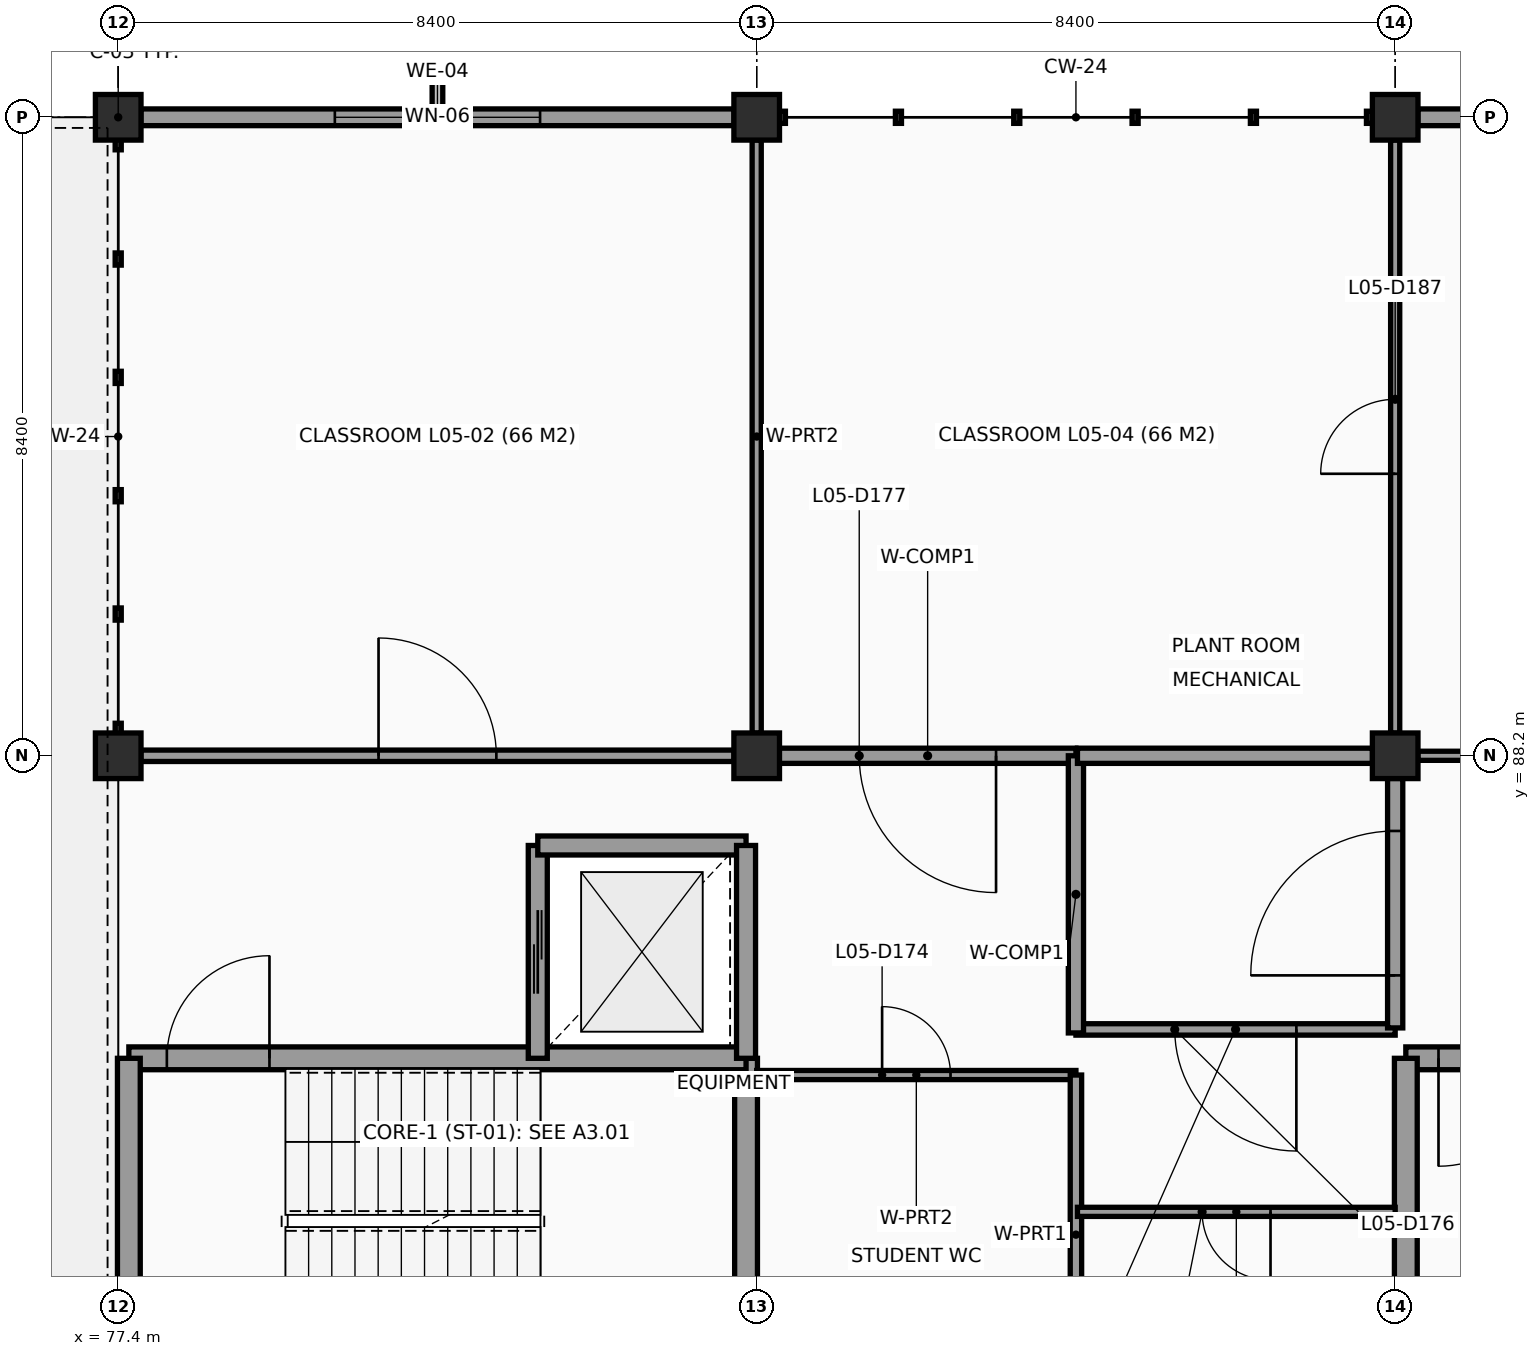
"""IFC4 building model, lengths in metres.
Left out: names, types, materials, properties, quantities, classifications, styles, units other than length and angle.
Written with IfcOpenShell. Run it as: python <this file> out.ifc"""

import sys

from ifc_helpers import new_model, si_unit, direction, frame, frame_2d, origin, origin_2d, place, context, subcontext, project, spatial, rectangle, extrude, element, fill, save


model = new_model("IFC4")
c1 = context("Model", 3, precision=1e-05, world=origin(), true_north=direction((0.0, 1.0)))
c2 = subcontext(c1, "Body", "Model", "MODEL_VIEW")
j1 = project(units=[si_unit("LENGTHUNIT", "METRE"), si_unit("PLANEANGLEUNIT", "RADIAN")], contexts=[c1])
p1 = place(None, origin())
s1 = spatial("IfcSite", under=j1, at=p1, CompositionType="ELEMENT")
p2 = place(p1, origin())
s2 = spatial("IfcBuilding", under=s1, at=p2, CompositionType="ELEMENT")
p3 = place(p2, frame((0.0, 0.0, 18.6)))
s3 = spatial("IfcBuildingStorey", under=s2, at=p3, CompositionType="ELEMENT", Elevation=18.6)
for number, where, z_axis, x_axis in (
    (1, (77.4, 88.2, 0.0), (0.0, 0.0, 1.0), (1.0, 0.0, 0.0)),
    (2, (77.4, 96.6, 0.0), (0.0, 0.0, 1.0), (1.0, 0.0, 0.0)),
    (3, (85.8, 88.2, 0.0), (0.0, 0.0, 1.0), (1.0, 0.0, 0.0)),
    (4, (85.8, 96.6, 0.0), (0.0, 0.0, 1.0), (1.0, 0.0, 0.0)),
    (5, (94.2, 88.2, 0.0), (0.0, 0.0, 1.0), (1.0, 0.0, 0.0)),
    (6, (94.2, 96.6, 0.0), (0.0, 0.0, 1.0), (1.0, 0.0, 0.0)),
):
    element("IfcColumn", number, at=place(p3, frame(where, z_axis=z_axis, x_axis=x_axis)), inside=s3, PredefinedType="COLUMN", context=c2, shape_type="SweptSolid", body=[
        extrude(rectangle(XDim=0.6, YDim=0.6, at=origin_2d()), origin(), (0.0, 0.0, 1.0), 3.6),
    ])
p4 = place(p3, frame((77.698, 96.6, 0.0), z_axis=(0.0, 0.0, 1.0), x_axis=(1.0, 0.0, 0.0)))
e7 = element("IfcWall", 7, at=p4, inside=s3, PredefinedType="SOLIDWALL", context=c2, shape_type="SweptSolid", body=[
    extrude(rectangle(XDim=7.804, YDim=0.22, at=frame_2d((3.902, 0.0))), origin(), (0.0, 0.0, 1.0), 2.65),
])
p5 = place(p4, frame((2.552, 0.0, 0.95)))
e8 = element("IfcOpeningElement", 8, at=p5, cuts=e7, PredefinedType="OPENING", context=c2, shape_type="SweptSolid", body=[
    extrude(rectangle(XDim=2.7, YDim=1.2, at=frame_2d((1.35, 0.6))), frame((0.0, 0.12, 0.0), z_axis=(0.0, -1.0, 0.0), x_axis=(1.0, 0.0, 0.0)), (0.0, 0.0, 1.0), 0.24),
])
p6 = place(p3, frame((94.498, 96.6, 0.0), z_axis=(0.0, 0.0, 1.0), x_axis=(1.0, 0.0, 0.0)))
e9 = element("IfcWall", 9, at=p6, inside=s3, PredefinedType="SOLIDWALL", context=c2, shape_type="SweptSolid", body=[
    extrude(rectangle(XDim=7.804, YDim=0.22, at=frame_2d((3.902, 0.0))), origin(), (0.0, 0.0, 1.0), 2.65),
])
p7 = place(p6, frame((2.402, 0.0, 0.95)))
e10 = element("IfcOpeningElement", 10, at=p7, cuts=e9, PredefinedType="OPENING", context=c2, shape_type="SweptSolid", body=[
    extrude(rectangle(XDim=3.0, YDim=1.2, at=frame_2d((1.5, 0.6))), frame((0.0, 0.12, 0.0), z_axis=(0.0, -1.0, 0.0), x_axis=(1.0, 0.0, 0.0)), (0.0, 0.0, 1.0), 0.24),
])
p8 = place(p3, frame((85.66, 79.94, 0.0), z_axis=(0.0, 0.0, 1.0), x_axis=(0.0, 1.0, 0.0)))
e11 = element("IfcWall", 11, at=p8, inside=s3, PredefinedType="SHEAR", context=c2, shape_type="SweptSolid", body=[
    extrude(rectangle(XDim=4.28, YDim=0.3, at=frame_2d((2.14, 0.0))), origin(), (0.0, 0.0, 1.0), 3.6),
])
p9 = place(p3, frame((85.66, 84.22, 0.0), z_axis=(0.0, 0.0, 1.0), x_axis=(-1.0, 0.0, 0.0)))
e12 = element("IfcWall", 12, at=p9, inside=s3, PredefinedType="SHEAR", context=c2, shape_type="SweptSolid", body=[
    extrude(rectangle(XDim=8.12, YDim=0.3, at=frame_2d((4.06, 0.0))), origin(), (0.0, 0.0, 1.0), 3.6),
])
p10 = place(p9, frame((6.27, 0.0, 0.0)))
e13 = element("IfcOpeningElement", 13, at=p10, cuts=e12, PredefinedType="OPENING", context=c2, shape_type="SweptSolid", body=[
    extrude(rectangle(XDim=1.35, YDim=2.15, at=frame_2d((0.675, 1.075))), frame((0.0, 0.16, 0.0), z_axis=(0.0, -1.0, 0.0), x_axis=(1.0, 0.0, 0.0)), (0.0, 0.0, 1.0), 0.32),
])
p11 = place(p3, frame((77.54, 84.22, 0.0), z_axis=(0.0, 0.0, 1.0), x_axis=(0.0, -1.0, 0.0)))
e14 = element("IfcWall", 14, at=p11, inside=s3, PredefinedType="SHEAR", context=c2, shape_type="SweptSolid", body=[
    extrude(rectangle(XDim=4.28, YDim=0.3, at=frame_2d((2.14, 0.0))), origin(), (0.0, 0.0, 1.0), 3.6),
])
p12 = place(p3, frame((82.92, 87.02, 0.0), z_axis=(0.0, 0.0, 1.0), x_axis=(0.0, -1.0, 0.0)))
e15 = element("IfcWall", 15, at=p12, inside=s3, PredefinedType="SHEAR", context=c2, shape_type="SweptSolid", body=[
    extrude(rectangle(XDim=2.8, YDim=0.25, at=frame_2d((1.4, 0.0))), origin(), (0.0, 0.0, 1.0), 3.6),
])
p13 = place(p12, frame((0.85, 0.0, 0.0)))
e16 = element("IfcOpeningElement", 16, at=p13, cuts=e15, PredefinedType="OPENING", context=c2, shape_type="SweptSolid", body=[
    extrude(rectangle(XDim=1.1, YDim=2.15, at=frame_2d((0.55, 1.075))), frame((0.0, 0.135, 0.0), z_axis=(0.0, -1.0, 0.0), x_axis=(1.0, 0.0, 0.0)), (0.0, 0.0, 1.0), 0.27),
])
p14 = place(p3, frame((85.66, 87.02, 0.0), z_axis=(0.0, 0.0, 1.0), x_axis=(-1.0, 0.0, 0.0)))
e17 = element("IfcWall", 17, at=p14, inside=s3, PredefinedType="SHEAR", context=c2, shape_type="SweptSolid", body=[
    extrude(rectangle(XDim=2.74, YDim=0.25, at=frame_2d((1.37, 0.0))), origin(), (0.0, 0.0, 1.0), 3.6),
])
p15 = place(p3, frame((85.66, 84.22, 0.0), z_axis=(0.0, 0.0, 1.0), x_axis=(0.0, 1.0, 0.0)))
e18 = element("IfcWall", 18, at=p15, inside=s3, PredefinedType="SHEAR", context=c2, shape_type="SweptSolid", body=[
    extrude(rectangle(XDim=2.8, YDim=0.25, at=frame_2d((1.4, 0.0))), origin(), (0.0, 0.0, 1.0), 3.6),
])
p16 = place(p3, frame((102.46, 84.22, 0.0), z_axis=(0.0, 0.0, 1.0), x_axis=(-1.0, 0.0, 0.0)))
e19 = element("IfcWall", 19, at=p16, inside=s3, PredefinedType="SHEAR", context=c2, shape_type="SweptSolid", body=[
    extrude(rectangle(XDim=8.12, YDim=0.3, at=frame_2d((4.06, 0.0))), origin(), (0.0, 0.0, 1.0), 3.6),
])
p17 = place(p16, frame((6.27, 0.0, 0.0)))
e20 = element("IfcOpeningElement", 20, at=p17, cuts=e19, PredefinedType="OPENING", context=c2, shape_type="SweptSolid", body=[
    extrude(rectangle(XDim=1.42, YDim=2.15, at=frame_2d((0.71, 1.075))), frame((0.0, 0.16, 0.0), z_axis=(0.0, -1.0, 0.0), x_axis=(1.0, 0.0, 0.0)), (0.0, 0.0, 1.0), 0.32),
])
p18 = place(p3, frame((94.34, 84.22, 0.0), z_axis=(0.0, 0.0, 1.0), x_axis=(0.0, -1.0, 0.0)))
e21 = element("IfcWall", 21, at=p18, inside=s3, PredefinedType="SHEAR", context=c2, shape_type="SweptSolid", body=[
    extrude(rectangle(XDim=4.28, YDim=0.3, at=frame_2d((2.14, 0.0))), origin(), (0.0, 0.0, 1.0), 3.6),
])
p19 = place(p3, frame((85.8, 84.0, 0.0), z_axis=(0.0, 0.0, 1.0), x_axis=(1.0, 0.0, 0.0)))
e22 = element("IfcWall", 22, at=p19, inside=s3, PredefinedType="PARTITIONING", context=c2, shape_type="SweptSolid", body=[
    extrude(rectangle(XDim=4.2, YDim=0.12, at=frame_2d((2.1, 0.0))), origin(), (0.0, 0.0, 1.0), 2.95),
])
p20 = place(p19, frame((1.65, 0.0, 0.0)))
e23 = element("IfcOpeningElement", 23, at=p20, cuts=e22, PredefinedType="OPENING", context=c2, shape_type="SweptSolid", body=[
    extrude(rectangle(XDim=0.9, YDim=2.1, at=frame_2d((0.45, 1.05))), frame((0.0, 0.07, 0.0), z_axis=(0.0, -1.0, 0.0), x_axis=(1.0, 0.0, 0.0)), (0.0, 0.0, 1.0), 0.14),
])
p21 = place(p3, frame((90.0, 84.0, 0.0), z_axis=(0.0, 0.0, 1.0), x_axis=(0.0, -1.0, 0.0)))
e24 = element("IfcWall", 24, at=p21, inside=s3, PredefinedType="PARTITIONING", context=c2, shape_type="SweptSolid", body=[
    extrude(rectangle(XDim=4.2, YDim=0.15, at=frame_2d((2.1, 0.0))), origin(), (0.0, 0.0, 1.0), 2.55),
])
p22 = place(p3, frame((90.02, 82.2, 0.0), z_axis=(0.0, 0.0, 1.0), x_axis=(1.0, 0.0, 0.0)))
e25 = element("IfcWall", 25, at=p22, inside=s3, PredefinedType="PARTITIONING", context=c2, shape_type="SweptSolid", body=[
    extrude(rectangle(XDim=4.18, YDim=0.12, at=frame_2d((2.09, 0.0))), origin(), (0.0, 0.0, 1.0), 2.99),
])
p23 = place(p22, frame((1.64, 0.0, 0.0)))
e26 = element("IfcOpeningElement", 26, at=p23, cuts=e25, PredefinedType="OPENING", context=c2, shape_type="SweptSolid", body=[
    extrude(rectangle(XDim=0.9, YDim=2.1, at=frame_2d((0.45, 1.05))), frame((0.0, 0.07, 0.0), z_axis=(0.0, -1.0, 0.0), x_axis=(1.0, 0.0, 0.0)), (0.0, 0.0, 1.0), 0.14),
])
p24 = place(p3, frame((90.0, 84.6, 0.0), z_axis=(0.0, 0.0, 1.0), x_axis=(1.0, 0.0, 0.0)))
e27 = element("IfcWall", 27, at=p24, inside=s3, PredefinedType="PARTITIONING", context=c2, shape_type="SweptSolid", body=[
    extrude(rectangle(XDim=4.2, YDim=0.15, at=frame_2d((2.1, 0.0))), origin(), (0.0, 0.0, 1.0), 2.99),
])
p25 = place(p24, frame((1.3, 0.0, 0.0)))
e28 = element("IfcOpeningElement", 28, at=p25, cuts=e27, PredefinedType="OPENING", context=c2, shape_type="SweptSolid", body=[
    extrude(rectangle(XDim=1.6, YDim=2.2, at=frame_2d((0.8, 1.1))), frame((0.0, 0.085, 0.0), z_axis=(0.0, -1.0, 0.0), x_axis=(1.0, 0.0, 0.0)), (0.0, 0.0, 1.0), 0.17),
])
p26 = place(p3, frame((86.098, 88.2, 0.0), z_axis=(0.0, 0.0, 1.0), x_axis=(1.0, 0.0, 0.0)))
e29 = element("IfcWall", 29, at=p26, inside=s3, PredefinedType="PARTITIONING", context=c2, shape_type="SweptSolid", body=[
    extrude(rectangle(XDim=3.902, YDim=0.2, at=frame_2d((1.951, 0.0))), origin(), (0.0, 0.0, 1.0), 2.9),
])
p27 = place(p26, frame((1.051, 0.0, 0.0)))
e30 = element("IfcOpeningElement", 30, at=p27, cuts=e29, PredefinedType="OPENING", context=c2, shape_type="SweptSolid", body=[
    extrude(rectangle(XDim=1.8, YDim=2.25, at=frame_2d((0.9, 1.125))), frame((0.0, 0.11, 0.0), z_axis=(0.0, -1.0, 0.0), x_axis=(1.0, 0.0, 0.0)), (0.0, 0.0, 1.0), 0.22),
])
p28 = place(p3, frame((90.0, 88.2, 0.0), z_axis=(0.0, 0.0, 1.0), x_axis=(0.0, -1.0, 0.0)))
e31 = element("IfcWall", 31, at=p28, inside=s3, PredefinedType="PARTITIONING", context=c2, shape_type="SweptSolid", body=[
    extrude(rectangle(XDim=3.646, YDim=0.2, at=frame_2d((1.823, 0.0))), origin(), (0.0, 0.0, 1.0), 2.9),
])
p29 = place(p3, frame((90.02, 88.2, 0.0), z_axis=(0.0, 0.0, 1.0), x_axis=(1.0, 0.0, 0.0)))
e32 = element("IfcWall", 32, at=p29, inside=s3, PredefinedType="PARTITIONING", context=c2, shape_type="SweptSolid", body=[
    extrude(rectangle(XDim=3.882, YDim=0.2, at=frame_2d((1.941, 0.0))), origin(), (0.0, 0.0, 1.0), 2.9),
])
p30 = place(p3, frame((94.2, 87.902, 0.0), z_axis=(0.0, 0.0, 1.0), x_axis=(0.0, -1.0, 0.0)))
e33 = element("IfcWall", 33, at=p30, inside=s3, PredefinedType="PARTITIONING", context=c2, shape_type="SweptSolid", body=[
    extrude(rectangle(XDim=3.282, YDim=0.2, at=frame_2d((1.641, 0.0))), origin(), (0.0, 0.0, 1.0), 2.99),
])
p31 = place(p30, frame((0.691, 0.0, 0.0)))
e34 = element("IfcOpeningElement", 34, at=p31, cuts=e33, PredefinedType="OPENING", context=c2, shape_type="SweptSolid", body=[
    extrude(rectangle(XDim=1.9, YDim=2.3, at=frame_2d((0.95, 1.15))), frame((0.0, 0.11, 0.0), z_axis=(0.0, -1.0, 0.0), x_axis=(1.0, 0.0, 0.0)), (0.0, 0.0, 1.0), 0.22),
])
p32 = place(p3, frame((85.8, 96.302, 0.0), z_axis=(0.0, 0.0, 1.0), x_axis=(0.0, -1.0, 0.0)))
e35 = element("IfcWall", 35, at=p32, inside=s3, PredefinedType="PARTITIONING", context=c2, shape_type="SweptSolid", body=[
    extrude(rectangle(XDim=7.804, YDim=0.12, at=frame_2d((3.902, 0.0))), origin(), (0.0, 0.0, 1.0), 2.95),
])
p33 = place(p3, frame((85.502, 88.2, 0.0), z_axis=(0.0, 0.0, 1.0), x_axis=(-1.0, 0.0, 0.0)))
e36 = element("IfcWall", 36, at=p33, inside=s3, PredefinedType="PARTITIONING", context=c2, shape_type="SweptSolid", body=[
    extrude(rectangle(XDim=7.804, YDim=0.15, at=frame_2d((3.902, 0.0))), origin(), (0.0, 0.0, 1.0), 2.9),
])
p34 = place(p33, frame((3.127, 0.0, 0.0)))
e37 = element("IfcOpeningElement", 37, at=p34, cuts=e36, PredefinedType="OPENING", context=c2, shape_type="SweptSolid", body=[
    extrude(rectangle(XDim=1.55, YDim=2.2, at=frame_2d((0.775, 1.1))), frame((0.0, 0.085, 0.0), z_axis=(0.0, -1.0, 0.0), x_axis=(1.0, 0.0, 0.0)), (0.0, 0.0, 1.0), 0.17),
])
p35 = place(p3, frame((94.2, 96.302, 0.0), z_axis=(0.0, 0.0, 1.0), x_axis=(0.0, -1.0, 0.0)))
e38 = element("IfcWall", 38, at=p35, inside=s3, PredefinedType="PARTITIONING", context=c2, shape_type="SweptSolid", body=[
    extrude(rectangle(XDim=7.804, YDim=0.12, at=frame_2d((3.902, 0.0))), origin(), (0.0, 0.0, 1.0), 2.99),
])
p36 = place(p35, frame((3.412, 0.0, 0.0)))
e39 = element("IfcOpeningElement", 39, at=p36, cuts=e38, PredefinedType="OPENING", context=c2, shape_type="SweptSolid", body=[
    extrude(rectangle(XDim=0.98, YDim=2.12, at=frame_2d((0.49, 1.06))), frame((0.0, 0.07, 0.0), z_axis=(0.0, -1.0, 0.0), x_axis=(1.0, 0.0, 0.0)), (0.0, 0.0, 1.0), 0.14),
])
p37 = place(p3, frame((102.302, 88.2, 0.0), z_axis=(0.0, 0.0, 1.0), x_axis=(-1.0, 0.0, 0.0)))
e40 = element("IfcWall", 40, at=p37, inside=s3, PredefinedType="PARTITIONING", context=c2, shape_type="SweptSolid", body=[
    extrude(rectangle(XDim=7.804, YDim=0.12, at=frame_2d((3.902, 0.0))), origin(), (0.0, 0.0, 1.0), 2.9),
])
p38 = place(p37, frame((3.442, 0.0, 0.0)))
e41 = element("IfcOpeningElement", 41, at=p38, cuts=e40, PredefinedType="OPENING", context=c2, shape_type="SweptSolid", body=[
    extrude(rectangle(XDim=0.92, YDim=2.1, at=frame_2d((0.46, 1.05))), frame((0.0, 0.07, 0.0), z_axis=(0.0, -1.0, 0.0), x_axis=(1.0, 0.0, 0.0)), (0.0, 0.0, 1.0), 0.14),
])
p39 = place(p5, origin())
e42 = element("IfcWindow", 42, at=p39, inside=s3, PartitioningType="SINGLE_PANEL", PredefinedType="WINDOW", context=c2, shape_type="SweptSolid", body=[
    extrude(rectangle(XDim=2.7, YDim=1.2, at=frame_2d((1.35, 0.6))), frame((0.0, 0.03, 0.0), z_axis=(0.0, -1.0, 0.0), x_axis=(1.0, 0.0, 0.0)), (0.0, 0.0, 1.0), 0.06),
])
fill(e8, e42)
p40 = place(p10, frame((1.35, 0.0, 0.0), z_axis=(0.0, 0.0, 1.0), x_axis=(-1.0, 0.0, 0.0)))
e43 = element("IfcDoor", 43, at=p40, inside=s3, OperationType="SINGLE_SWING_LEFT", PredefinedType="DOOR", context=c2, shape_type="SweptSolid", body=[
    extrude(rectangle(XDim=1.35, YDim=2.15, at=frame_2d((0.675, 1.075))), frame((0.0, 0.025, 0.0), z_axis=(0.0, -1.0, 0.0), x_axis=(1.0, 0.0, 0.0)), (0.0, 0.0, 1.0), 0.05),
])
fill(e13, e43)
p41 = place(p13, origin())
e44 = element("IfcDoor", 44, at=p41, inside=s3, OperationType="DOUBLE_DOOR_SLIDING", PredefinedType="DOOR", context=c2, shape_type="SweptSolid", body=[
    extrude(rectangle(XDim=1.1, YDim=2.15, at=frame_2d((0.55, 1.075))), frame((0.0, 0.025, 0.0), z_axis=(0.0, -1.0, 0.0), x_axis=(1.0, 0.0, 0.0)), (0.0, 0.0, 1.0), 0.05),
])
fill(e16, e44)
p42 = place(p17, frame((1.42, 0.0, 0.0), z_axis=(0.0, 0.0, 1.0), x_axis=(-1.0, 0.0, 0.0)))
e45 = element("IfcDoor", 45, at=p42, inside=s3, OperationType="SINGLE_SWING_RIGHT", PredefinedType="DOOR", context=c2, shape_type="SweptSolid", body=[
    extrude(rectangle(XDim=1.42, YDim=2.15, at=frame_2d((0.71, 1.075))), frame((0.0, 0.025, 0.0), z_axis=(0.0, -1.0, 0.0), x_axis=(1.0, 0.0, 0.0)), (0.0, 0.0, 1.0), 0.05),
])
fill(e20, e45)
p43 = place(p20, origin())
e46 = element("IfcDoor", 46, at=p43, inside=s3, OperationType="SINGLE_SWING_LEFT", PredefinedType="DOOR", context=c2, shape_type="SweptSolid", body=[
    extrude(rectangle(XDim=0.9, YDim=2.1, at=frame_2d((0.45, 1.05))), frame((0.0, 0.025, 0.0), z_axis=(0.0, -1.0, 0.0), x_axis=(1.0, 0.0, 0.0)), (0.0, 0.0, 1.0), 0.05),
])
fill(e23, e46)
p44 = place(p23, origin())
e47 = element("IfcDoor", 47, at=p44, inside=s3, OperationType="SINGLE_SWING_RIGHT", PredefinedType="DOOR", context=c2, shape_type="SweptSolid", body=[
    extrude(rectangle(XDim=0.9, YDim=2.1, at=frame_2d((0.45, 1.05))), frame((0.0, 0.025, 0.0), z_axis=(0.0, -1.0, 0.0), x_axis=(1.0, 0.0, 0.0)), (0.0, 0.0, 1.0), 0.05),
])
fill(e26, e47)
p45 = place(p25, origin())
e48 = element("IfcDoor", 48, at=p45, inside=s3, OperationType="DOUBLE_DOOR_SINGLE_SWING", PredefinedType="DOOR", context=c2, shape_type="SweptSolid", body=[
    extrude(rectangle(XDim=1.6, YDim=2.2, at=frame_2d((0.8, 1.1))), frame((0.0, 0.025, 0.0), z_axis=(0.0, -1.0, 0.0), x_axis=(1.0, 0.0, 0.0)), (0.0, 0.0, 1.0), 0.05),
])
fill(e28, e48)
p46 = place(p27, origin())
e49 = element("IfcDoor", 49, at=p46, inside=s3, OperationType="DOUBLE_DOOR_SINGLE_SWING", PredefinedType="DOOR", context=c2, shape_type="SweptSolid", body=[
    extrude(rectangle(XDim=1.8, YDim=2.25, at=frame_2d((0.9, 1.125))), frame((0.0, 0.025, 0.0), z_axis=(0.0, -1.0, 0.0), x_axis=(1.0, 0.0, 0.0)), (0.0, 0.0, 1.0), 0.05),
])
fill(e30, e49)
p47 = place(p31, origin())
e50 = element("IfcDoor", 50, at=p47, inside=s3, OperationType="DOUBLE_DOOR_SINGLE_SWING", PredefinedType="DOOR", context=c2, shape_type="SweptSolid", body=[
    extrude(rectangle(XDim=1.9, YDim=2.3, at=frame_2d((0.95, 1.15))), frame((0.0, 0.025, 0.0), z_axis=(0.0, -1.0, 0.0), x_axis=(1.0, 0.0, 0.0)), (0.0, 0.0, 1.0), 0.05),
])
fill(e34, e50)
p48 = place(p34, origin())
e51 = element("IfcDoor", 51, at=p48, inside=s3, OperationType="DOUBLE_DOOR_SINGLE_SWING", PredefinedType="DOOR", context=c2, shape_type="SweptSolid", body=[
    extrude(rectangle(XDim=1.55, YDim=2.2, at=frame_2d((0.775, 1.1))), frame((0.0, 0.025, 0.0), z_axis=(0.0, -1.0, 0.0), x_axis=(1.0, 0.0, 0.0)), (0.0, 0.0, 1.0), 0.05),
])
fill(e37, e51)
p49 = place(p36, origin())
e52 = element("IfcDoor", 52, at=p49, inside=s3, OperationType="SINGLE_SWING_RIGHT", PredefinedType="DOOR", context=c2, shape_type="SweptSolid", body=[
    extrude(rectangle(XDim=0.98, YDim=2.12, at=frame_2d((0.49, 1.06))), frame((0.0, 0.025, 0.0), z_axis=(0.0, -1.0, 0.0), x_axis=(1.0, 0.0, 0.0)), (0.0, 0.0, 1.0), 0.05),
])
fill(e39, e52)
save(model, sys.argv[1])
